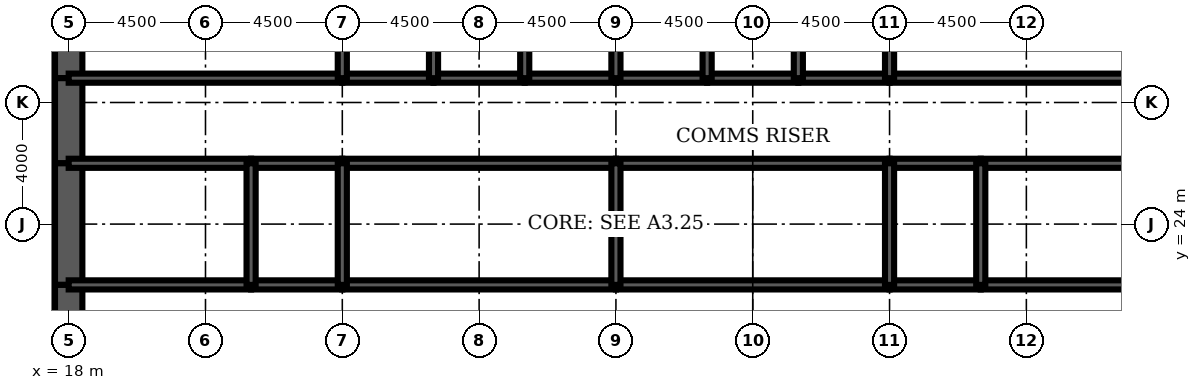
"""IFC4 building model, lengths in metres.
Left out: names, types, materials, properties, quantities, classifications, styles, units other than length and angle.
Written with IfcOpenShell. Run it as: python <this file> out.ifc"""

import sys

from ifc_helpers import new_model, si_unit, direction, frame, frame_2d, origin, place, context, subcontext, project, spatial, rectangle, extrude, element, fill, save


model = new_model("IFC4")
c1 = context("Model", 3, precision=1e-05, world=origin(), true_north=direction((0.0, 1.0)))
c2 = subcontext(c1, "Body", "Model", "MODEL_VIEW")
j1 = project(units=[si_unit("LENGTHUNIT", "METRE"), si_unit("PLANEANGLEUNIT", "RADIAN")], contexts=[c1])
p1 = place(None, origin())
s1 = spatial("IfcSite", under=j1, at=p1, CompositionType="ELEMENT")
p2 = place(p1, origin())
s2 = spatial("IfcBuilding", under=s1, at=p2, CompositionType="ELEMENT")
p3 = place(p2, frame((0.0, 0.0, 108.9)))
s3 = spatial("IfcBuildingStorey", under=s2, at=p3, CompositionType="ELEMENT", Elevation=108.9)
p4 = place(p3, frame((18.0, 32.0, 0.0), z_axis=(0.0, 0.0, 1.0), x_axis=(0.0, -1.0, 0.0)))
e1 = element("IfcWall", 1, at=p4, inside=s3, PredefinedType="SHEAR", context=c2, shape_type="SweptSolid", body=[
    extrude(rectangle(XDim=3.2, YDim=0.9, at=frame_2d((1.6, 0.0))), origin(), (0.0, 0.0, 1.0), 4.2),
])
p5 = place(p3, frame((18.0, 28.8, 0.0), z_axis=(0.0, 0.0, 1.0), x_axis=(0.0, -1.0, 0.0)))
e2 = element("IfcWall", 2, at=p5, inside=s3, PredefinedType="SHEAR", context=c2, shape_type="SweptSolid", body=[
    extrude(rectangle(XDim=2.8, YDim=0.9, at=frame_2d((1.4, 0.0))), origin(), (0.0, 0.0, 1.0), 4.2),
])
p6 = place(p5, frame((0.4, 0.0, 0.0)))
e3 = element("IfcOpeningElement", 3, at=p6, cuts=e2, PredefinedType="OPENING", context=c2, shape_type="SweptSolid", body=[
    extrude(rectangle(XDim=1.8, YDim=2.1, at=frame_2d((0.9, 1.05))), frame((0.0, 0.46, 0.0), z_axis=(0.0, -1.0, 0.0), x_axis=(1.0, 0.0, 0.0)), (0.0, 0.0, 1.0), 0.92),
])
p7 = place(p3, frame((18.0, 26.0, 0.0), z_axis=(0.0, 0.0, 1.0), x_axis=(0.0, -1.0, 0.0)))
e4 = element("IfcWall", 4, at=p7, inside=s3, PredefinedType="SHEAR", context=c2, shape_type="SweptSolid", body=[
    extrude(rectangle(XDim=4.0, YDim=0.9, at=frame_2d((2.0, 0.0))), origin(), (0.0, 0.0, 1.0), 4.2),
])
p8 = place(p3, frame((18.0, 22.0, 0.0), z_axis=(0.0, 0.0, 1.0), x_axis=(0.0, -1.0, 0.0)))
e5 = element("IfcWall", 5, at=p8, inside=s3, PredefinedType="SHEAR", context=c2, shape_type="SweptSolid", body=[
    extrude(rectangle(XDim=2.8, YDim=0.9, at=frame_2d((1.4, 0.0))), origin(), (0.0, 0.0, 1.0), 4.2),
])
p9 = place(p8, frame((0.6, 0.0, 0.0)))
e6 = element("IfcOpeningElement", 6, at=p9, cuts=e5, PredefinedType="OPENING", context=c2, shape_type="SweptSolid", body=[
    extrude(rectangle(XDim=1.8, YDim=2.1, at=frame_2d((0.9, 1.05))), frame((0.0, 0.46, 0.0), z_axis=(0.0, -1.0, 0.0), x_axis=(1.0, 0.0, 0.0)), (0.0, 0.0, 1.0), 0.92),
])
p10 = place(p3, frame((18.0, 28.8, 0.0), z_axis=(0.0, 0.0, 1.0), x_axis=(1.0, 0.0, 0.0)))
e7 = element("IfcWall", 7, at=p10, inside=s3, PredefinedType="SOLIDWALL", context=c2, shape_type="SweptSolid", body=[
    extrude(rectangle(XDim=9.0, YDim=0.3, at=frame_2d((4.5, 0.0))), origin(), (0.0, 0.0, 1.0), 4.2),
])
p11 = place(p10, frame((0.65, 0.0, 0.0)))
e8 = element("IfcOpeningElement", 8, at=p11, cuts=e7, PredefinedType="OPENING", context=c2, shape_type="SweptSolid", body=[
    extrude(rectangle(XDim=1.0, YDim=2.1, at=frame_2d((0.5, 1.05))), frame((0.0, 0.16, 0.0), z_axis=(0.0, -1.0, 0.0), x_axis=(1.0, 0.0, 0.0)), (0.0, 0.0, 1.0), 0.32),
])
p12 = place(p3, frame((27.0, 28.8, 0.0), z_axis=(0.0, 0.0, 1.0), x_axis=(1.0, 0.0, 0.0)))
e9 = element("IfcWall", 9, at=p12, inside=s3, PredefinedType="SOLIDWALL", context=c2, shape_type="SweptSolid", body=[
    extrude(rectangle(XDim=3.0, YDim=0.3, at=frame_2d((1.5, 0.0))), origin(), (0.0, 0.0, 1.0), 4.2),
])
p13 = place(p12, frame((0.95, 0.0, 0.0)))
e10 = element("IfcOpeningElement", 10, at=p13, cuts=e9, PredefinedType="OPENING", context=c2, shape_type="SweptSolid", body=[
    extrude(rectangle(XDim=1.1, YDim=2.2, at=frame_2d((0.55, 1.1))), frame((0.0, 0.16, 0.0), z_axis=(0.0, -1.0, 0.0), x_axis=(1.0, 0.0, 0.0)), (0.0, 0.0, 1.0), 0.32),
])
p14 = place(p3, frame((30.0, 28.8, 0.0), z_axis=(0.0, 0.0, 1.0), x_axis=(1.0, 0.0, 0.0)))
e11 = element("IfcWall", 11, at=p14, inside=s3, PredefinedType="SOLIDWALL", context=c2, shape_type="SweptSolid", body=[
    extrude(rectangle(XDim=3.0, YDim=0.3, at=frame_2d((1.5, 0.0))), origin(), (0.0, 0.0, 1.0), 4.2),
])
p15 = place(p14, frame((0.95, 0.0, 0.0)))
e12 = element("IfcOpeningElement", 12, at=p15, cuts=e11, PredefinedType="OPENING", context=c2, shape_type="SweptSolid", body=[
    extrude(rectangle(XDim=1.1, YDim=2.2, at=frame_2d((0.55, 1.1))), frame((0.0, 0.16, 0.0), z_axis=(0.0, -1.0, 0.0), x_axis=(1.0, 0.0, 0.0)), (0.0, 0.0, 1.0), 0.32),
])
p16 = place(p3, frame((33.0, 28.8, 0.0), z_axis=(0.0, 0.0, 1.0), x_axis=(1.0, 0.0, 0.0)))
e13 = element("IfcWall", 13, at=p16, inside=s3, PredefinedType="SOLIDWALL", context=c2, shape_type="SweptSolid", body=[
    extrude(rectangle(XDim=3.0, YDim=0.3, at=frame_2d((1.5, 0.0))), origin(), (0.0, 0.0, 1.0), 4.2),
])
p17 = place(p16, frame((0.95, 0.0, 0.0)))
e14 = element("IfcOpeningElement", 14, at=p17, cuts=e13, PredefinedType="OPENING", context=c2, shape_type="SweptSolid", body=[
    extrude(rectangle(XDim=1.1, YDim=2.2, at=frame_2d((0.55, 1.1))), frame((0.0, 0.16, 0.0), z_axis=(0.0, -1.0, 0.0), x_axis=(1.0, 0.0, 0.0)), (0.0, 0.0, 1.0), 0.32),
])
for number, where, z_axis, x_axis in (
    (15, (36.0, 28.8, 0.0), (0.0, 0.0, 1.0), (1.0, 0.0, 0.0)),
    (16, (39.0, 28.8, 0.0), (0.0, 0.0, 1.0), (1.0, 0.0, 0.0)),
):
    element("IfcWall", number, at=place(p3, frame(where, z_axis=z_axis, x_axis=x_axis)), inside=s3, PredefinedType="SOLIDWALL", context=c2, shape_type="SweptSolid", body=[
        extrude(rectangle(XDim=3.0, YDim=0.3, at=frame_2d((1.5, 0.0))), origin(), (0.0, 0.0, 1.0), 4.2),
    ])
p18 = place(p3, frame((42.0, 28.8, 0.0), z_axis=(0.0, 0.0, 1.0), x_axis=(1.0, 0.0, 0.0)))
e17 = element("IfcWall", 17, at=p18, inside=s3, PredefinedType="SOLIDWALL", context=c2, shape_type="SweptSolid", body=[
    extrude(rectangle(XDim=3.0, YDim=0.3, at=frame_2d((1.5, 0.0))), origin(), (0.0, 0.0, 1.0), 4.2),
])
p19 = place(p18, frame((0.95, 0.0, 0.0)))
e18 = element("IfcOpeningElement", 18, at=p19, cuts=e17, PredefinedType="OPENING", context=c2, shape_type="SweptSolid", body=[
    extrude(rectangle(XDim=1.1, YDim=2.2, at=frame_2d((0.55, 1.1))), frame((0.0, 0.16, 0.0), z_axis=(0.0, -1.0, 0.0), x_axis=(1.0, 0.0, 0.0)), (0.0, 0.0, 1.0), 0.32),
])
p20 = place(p3, frame((45.0, 28.8, 0.0), z_axis=(0.0, 0.0, 1.0), x_axis=(1.0, 0.0, 0.0)))
e19 = element("IfcWall", 19, at=p20, inside=s3, PredefinedType="SOLIDWALL", context=c2, shape_type="SweptSolid", body=[
    extrude(rectangle(XDim=9.0, YDim=0.3, at=frame_2d((4.5, 0.0))), origin(), (0.0, 0.0, 1.0), 4.2),
])
p21 = place(p20, frame((7.35, 0.0, 0.0)))
e20 = element("IfcOpeningElement", 20, at=p21, cuts=e19, PredefinedType="OPENING", context=c2, shape_type="SweptSolid", body=[
    extrude(rectangle(XDim=1.0, YDim=2.1, at=frame_2d((0.5, 1.05))), frame((0.0, 0.16, 0.0), z_axis=(0.0, -1.0, 0.0), x_axis=(1.0, 0.0, 0.0)), (0.0, 0.0, 1.0), 0.32),
])
p22 = place(p3, frame((18.0, 22.0, 0.0), z_axis=(0.0, 0.0, 1.0), x_axis=(1.0, 0.0, 0.0)))
e21 = element("IfcWall", 21, at=p22, inside=s3, PredefinedType="SOLIDWALL", context=c2, shape_type="SweptSolid", body=[
    extrude(rectangle(XDim=6.0, YDim=0.3, at=frame_2d((3.0, 0.0))), origin(), (0.0, 0.0, 1.0), 4.2),
])
p23 = place(p22, frame((4.4, 0.0, 0.0)))
e22 = element("IfcOpeningElement", 22, at=p23, cuts=e21, PredefinedType="OPENING", context=c2, shape_type="SweptSolid", body=[
    extrude(rectangle(XDim=1.0, YDim=2.1, at=frame_2d((0.5, 1.05))), frame((0.0, 0.16, 0.0), z_axis=(0.0, -1.0, 0.0), x_axis=(1.0, 0.0, 0.0)), (0.0, 0.0, 1.0), 0.32),
])
p24 = place(p22, frame((0.85, 0.0, 0.0)))
e23 = element("IfcOpeningElement", 23, at=p24, cuts=e21, PredefinedType="OPENING", context=c2, shape_type="SweptSolid", body=[
    extrude(rectangle(XDim=1.0, YDim=2.1, at=frame_2d((0.5, 1.05))), frame((0.0, 0.16, 0.0), z_axis=(0.0, -1.0, 0.0), x_axis=(1.0, 0.0, 0.0)), (0.0, 0.0, 1.0), 0.32),
])
p25 = place(p3, frame((24.0, 22.0, 0.0), z_axis=(0.0, 0.0, 1.0), x_axis=(1.0, 0.0, 0.0)))
e24 = element("IfcWall", 24, at=p25, inside=s3, PredefinedType="SOLIDWALL", context=c2, shape_type="SweptSolid", body=[
    extrude(rectangle(XDim=3.0, YDim=0.3, at=frame_2d((1.5, 0.0))), origin(), (0.0, 0.0, 1.0), 4.2),
])
p26 = place(p25, frame((1.0, 0.0, 0.0)))
e25 = element("IfcOpeningElement", 25, at=p26, cuts=e24, PredefinedType="OPENING", context=c2, shape_type="SweptSolid", body=[
    extrude(rectangle(XDim=1.0, YDim=2.1, at=frame_2d((0.5, 1.05))), frame((0.0, 0.16, 0.0), z_axis=(0.0, -1.0, 0.0), x_axis=(1.0, 0.0, 0.0)), (0.0, 0.0, 1.0), 0.32),
])
p27 = place(p3, frame((27.0, 22.0, 0.0), z_axis=(0.0, 0.0, 1.0), x_axis=(1.0, 0.0, 0.0)))
e26 = element("IfcWall", 26, at=p27, inside=s3, PredefinedType="SOLIDWALL", context=c2, shape_type="SweptSolid", body=[
    extrude(rectangle(XDim=9.0, YDim=0.3, at=frame_2d((4.5, 0.0))), origin(), (0.0, 0.0, 1.0), 4.2),
])
p28 = place(p27, frame((4.0, 0.0, 0.0)))
e27 = element("IfcOpeningElement", 27, at=p28, cuts=e26, PredefinedType="OPENING", context=c2, shape_type="SweptSolid", body=[
    extrude(rectangle(XDim=1.0, YDim=2.1, at=frame_2d((0.5, 1.05))), frame((0.0, 0.16, 0.0), z_axis=(0.0, -1.0, 0.0), x_axis=(1.0, 0.0, 0.0)), (0.0, 0.0, 1.0), 0.32),
])
p29 = place(p3, frame((36.0, 22.0, 0.0), z_axis=(0.0, 0.0, 1.0), x_axis=(1.0, 0.0, 0.0)))
e28 = element("IfcWall", 28, at=p29, inside=s3, PredefinedType="SOLIDWALL", context=c2, shape_type="SweptSolid", body=[
    extrude(rectangle(XDim=9.0, YDim=0.3, at=frame_2d((4.5, 0.0))), origin(), (0.0, 0.0, 1.0), 4.2),
])
p30 = place(p29, frame((4.0, 0.0, 0.0)))
e29 = element("IfcOpeningElement", 29, at=p30, cuts=e28, PredefinedType="OPENING", context=c2, shape_type="SweptSolid", body=[
    extrude(rectangle(XDim=1.0, YDim=2.1, at=frame_2d((0.5, 1.05))), frame((0.0, 0.16, 0.0), z_axis=(0.0, -1.0, 0.0), x_axis=(1.0, 0.0, 0.0)), (0.0, 0.0, 1.0), 0.32),
])
p31 = place(p3, frame((45.0, 22.0, 0.0), z_axis=(0.0, 0.0, 1.0), x_axis=(1.0, 0.0, 0.0)))
e30 = element("IfcWall", 30, at=p31, inside=s3, PredefinedType="SOLIDWALL", context=c2, shape_type="SweptSolid", body=[
    extrude(rectangle(XDim=3.0, YDim=0.3, at=frame_2d((1.5, 0.0))), origin(), (0.0, 0.0, 1.0), 4.2),
])
p32 = place(p31, frame((1.0, 0.0, 0.0)))
e31 = element("IfcOpeningElement", 31, at=p32, cuts=e30, PredefinedType="OPENING", context=c2, shape_type="SweptSolid", body=[
    extrude(rectangle(XDim=1.0, YDim=2.1, at=frame_2d((0.5, 1.05))), frame((0.0, 0.16, 0.0), z_axis=(0.0, -1.0, 0.0), x_axis=(1.0, 0.0, 0.0)), (0.0, 0.0, 1.0), 0.32),
])
p33 = place(p3, frame((48.0, 22.0, 0.0), z_axis=(0.0, 0.0, 1.0), x_axis=(1.0, 0.0, 0.0)))
e32 = element("IfcWall", 32, at=p33, inside=s3, PredefinedType="SOLIDWALL", context=c2, shape_type="SweptSolid", body=[
    extrude(rectangle(XDim=6.0, YDim=0.3, at=frame_2d((3.0, 0.0))), origin(), (0.0, 0.0, 1.0), 4.2),
])
p34 = place(p33, frame((2.0, 0.0, 0.0)))
e33 = element("IfcOpeningElement", 33, at=p34, cuts=e32, PredefinedType="OPENING", context=c2, shape_type="SweptSolid", body=[
    extrude(rectangle(XDim=1.0, YDim=2.1, at=frame_2d((0.5, 1.05))), frame((0.0, 0.16, 0.0), z_axis=(0.0, -1.0, 0.0), x_axis=(1.0, 0.0, 0.0)), (0.0, 0.0, 1.0), 0.32),
])
p35 = place(p33, frame((4.15, 0.0, 0.0)))
e34 = element("IfcOpeningElement", 34, at=p35, cuts=e32, PredefinedType="OPENING", context=c2, shape_type="SweptSolid", body=[
    extrude(rectangle(XDim=1.0, YDim=2.1, at=frame_2d((0.5, 1.05))), frame((0.0, 0.16, 0.0), z_axis=(0.0, -1.0, 0.0), x_axis=(1.0, 0.0, 0.0)), (0.0, 0.0, 1.0), 0.32),
])
p36 = place(p3, frame((18.0, 26.0, 0.0), z_axis=(0.0, 0.0, 1.0), x_axis=(1.0, 0.0, 0.0)))
e35 = element("IfcWall", 35, at=p36, inside=s3, PredefinedType="SOLIDWALL", context=c2, shape_type="SweptSolid", body=[
    extrude(rectangle(XDim=6.0, YDim=0.3, at=frame_2d((3.0, 0.0))), origin(), (0.0, 0.0, 1.0), 4.2),
])
p37 = place(p3, frame((24.0, 26.0, 0.0), z_axis=(0.0, 0.0, 1.0), x_axis=(1.0, 0.0, 0.0)))
e36 = element("IfcWall", 36, at=p37, inside=s3, PredefinedType="SOLIDWALL", context=c2, shape_type="SweptSolid", body=[
    extrude(rectangle(XDim=3.0, YDim=0.3, at=frame_2d((1.5, 0.0))), origin(), (0.0, 0.0, 1.0), 4.2),
])
for number, where, z_axis, x_axis in (
    (37, (27.0, 26.0, 0.0), (0.0, 0.0, 1.0), (1.0, 0.0, 0.0)),
    (38, (36.0, 26.0, 0.0), (0.0, 0.0, 1.0), (1.0, 0.0, 0.0)),
):
    element("IfcWall", number, at=place(p3, frame(where, z_axis=z_axis, x_axis=x_axis)), inside=s3, PredefinedType="SOLIDWALL", context=c2, shape_type="SweptSolid", body=[
        extrude(rectangle(XDim=9.0, YDim=0.3, at=frame_2d((4.5, 0.0))), origin(), (0.0, 0.0, 1.0), 4.2),
    ])
p38 = place(p3, frame((45.0, 26.0, 0.0), z_axis=(0.0, 0.0, 1.0), x_axis=(1.0, 0.0, 0.0)))
e39 = element("IfcWall", 39, at=p38, inside=s3, PredefinedType="SOLIDWALL", context=c2, shape_type="SweptSolid", body=[
    extrude(rectangle(XDim=3.0, YDim=0.3, at=frame_2d((1.5, 0.0))), origin(), (0.0, 0.0, 1.0), 4.2),
])
p39 = place(p3, frame((48.0, 26.0, 0.0), z_axis=(0.0, 0.0, 1.0), x_axis=(1.0, 0.0, 0.0)))
e40 = element("IfcWall", 40, at=p39, inside=s3, PredefinedType="SOLIDWALL", context=c2, shape_type="SweptSolid", body=[
    extrude(rectangle(XDim=6.0, YDim=0.3, at=frame_2d((3.0, 0.0))), origin(), (0.0, 0.0, 1.0), 4.2),
])
for number, where, z_axis, x_axis in (
    (41, (27.0, 28.8, 0.0), (0.0, 0.0, 1.0), (0.0, 1.0, 0.0)),
    (42, (30.0, 28.8, 0.0), (0.0, 0.0, 1.0), (0.0, 1.0, 0.0)),
    (43, (33.0, 28.8, 0.0), (0.0, 0.0, 1.0), (0.0, 1.0, 0.0)),
    (44, (36.0, 28.8, 0.0), (0.0, 0.0, 1.0), (0.0, 1.0, 0.0)),
    (45, (39.0, 28.8, 0.0), (0.0, 0.0, 1.0), (0.0, 1.0, 0.0)),
    (46, (42.0, 28.8, 0.0), (0.0, 0.0, 1.0), (0.0, 1.0, 0.0)),
    (47, (45.0, 28.8, 0.0), (0.0, 0.0, 1.0), (0.0, 1.0, 0.0)),
):
    element("IfcWall", number, at=place(p3, frame(where, z_axis=z_axis, x_axis=x_axis)), inside=s3, PredefinedType="SOLIDWALL", context=c2, shape_type="SweptSolid", body=[
        extrude(rectangle(XDim=3.2, YDim=0.3, at=frame_2d((1.6, 0.0))), origin(), (0.0, 0.0, 1.0), 4.2),
    ])
for number, where, z_axis, x_axis in (
    (48, (24.0, 22.0, 0.0), (0.0, 0.0, 1.0), (0.0, 1.0, 0.0)),
    (49, (27.0, 22.0, 0.0), (0.0, 0.0, 1.0), (0.0, 1.0, 0.0)),
    (50, (36.0, 22.0, 0.0), (0.0, 0.0, 1.0), (0.0, 1.0, 0.0)),
    (51, (45.0, 22.0, 0.0), (0.0, 0.0, 1.0), (0.0, 1.0, 0.0)),
    (52, (48.0, 22.0, 0.0), (0.0, 0.0, 1.0), (0.0, 1.0, 0.0)),
):
    element("IfcWall", number, at=place(p3, frame(where, z_axis=z_axis, x_axis=x_axis)), inside=s3, PredefinedType="SOLIDWALL", context=c2, shape_type="SweptSolid", body=[
        extrude(rectangle(XDim=4.0, YDim=0.3, at=frame_2d((2.0, 0.0))), origin(), (0.0, 0.0, 1.0), 4.2),
    ])
for number, where, z_axis, x_axis in (
    (53, (20.325, 22.15, 0.0), (0.0, 0.0, 1.0), (0.0, 1.0, 0.0)),
    (54, (51.675, 22.15, 0.0), (0.0, 0.0, 1.0), (0.0, 1.0, 0.0)),
):
    element("IfcWall", number, at=place(p3, frame(where, z_axis=z_axis, x_axis=x_axis)), inside=s3, PredefinedType="PARTITIONING", context=c2, shape_type="SweptSolid", body=[
        extrude(rectangle(XDim=3.7, YDim=0.15, at=frame_2d((1.85, 0.0))), origin(), (0.0, 0.0, 1.0), 3.0),
    ])
p40 = place(p3, frame((23.7, 26.15, 0.0), z_axis=(0.0, 0.0, 1.0), x_axis=(0.0, 1.0, 0.0)))
e55 = element("IfcWall", 55, at=p40, inside=s3, PredefinedType="PARTITIONING", context=c2, shape_type="SweptSolid", body=[
    extrude(rectangle(XDim=2.5, YDim=0.15, at=frame_2d((1.25, 0.0))), origin(), (0.0, 0.0, 1.0), 3.0),
])
p41 = place(p40, frame((0.35, 0.0, 0.0)))
e56 = element("IfcOpeningElement", 56, at=p41, cuts=e55, PredefinedType="OPENING", context=c2, shape_type="SweptSolid", body=[
    extrude(rectangle(XDim=1.0, YDim=2.1, at=frame_2d((0.5, 1.05))), frame((0.0, 0.085, 0.0), z_axis=(0.0, -1.0, 0.0), x_axis=(1.0, 0.0, 0.0)), (0.0, 0.0, 1.0), 0.17),
])
p42 = place(p41, origin())
e57 = element("IfcDoor", 57, at=p42, inside=s3, OperationType="SINGLE_SWING_LEFT", PredefinedType="DOOR", context=c2, shape_type="SweptSolid", body=[
    extrude(rectangle(XDim=1.0, YDim=2.1, at=frame_2d((0.5, 1.05))), frame((0.0, 0.025, 0.0), z_axis=(0.0, -1.0, 0.0), x_axis=(1.0, 0.0, 0.0)), (0.0, 0.0, 1.0), 0.05),
])
fill(e56, e57)
p43 = place(p19, origin())
e58 = element("IfcDoor", 58, at=p43, inside=s3, OperationType="DOUBLE_DOOR_SLIDING", PredefinedType="USERDEFINED", context=c2, shape_type="SweptSolid", body=[
    extrude(rectangle(XDim=1.1, YDim=2.2, at=frame_2d((0.55, 1.1))), frame((0.0, 0.025, 0.0), z_axis=(0.0, -1.0, 0.0), x_axis=(1.0, 0.0, 0.0)), (0.0, 0.0, 1.0), 0.05),
])
fill(e18, e58)
p44 = place(p13, origin())
e59 = element("IfcDoor", 59, at=p44, inside=s3, OperationType="DOUBLE_DOOR_SLIDING", PredefinedType="USERDEFINED", context=c2, shape_type="SweptSolid", body=[
    extrude(rectangle(XDim=1.1, YDim=2.2, at=frame_2d((0.55, 1.1))), frame((0.0, 0.025, 0.0), z_axis=(0.0, -1.0, 0.0), x_axis=(1.0, 0.0, 0.0)), (0.0, 0.0, 1.0), 0.05),
])
fill(e10, e59)
p45 = place(p15, origin())
e60 = element("IfcDoor", 60, at=p45, inside=s3, OperationType="DOUBLE_DOOR_SLIDING", PredefinedType="USERDEFINED", context=c2, shape_type="SweptSolid", body=[
    extrude(rectangle(XDim=1.1, YDim=2.2, at=frame_2d((0.55, 1.1))), frame((0.0, 0.025, 0.0), z_axis=(0.0, -1.0, 0.0), x_axis=(1.0, 0.0, 0.0)), (0.0, 0.0, 1.0), 0.05),
])
fill(e12, e60)
p46 = place(p17, origin())
e61 = element("IfcDoor", 61, at=p46, inside=s3, OperationType="DOUBLE_DOOR_SLIDING", PredefinedType="USERDEFINED", context=c2, shape_type="SweptSolid", body=[
    extrude(rectangle(XDim=1.1, YDim=2.2, at=frame_2d((0.55, 1.1))), frame((0.0, 0.025, 0.0), z_axis=(0.0, -1.0, 0.0), x_axis=(1.0, 0.0, 0.0)), (0.0, 0.0, 1.0), 0.05),
])
fill(e14, e61)
p47 = place(p11, origin())
e62 = element("IfcDoor", 62, at=p47, inside=s3, OperationType="SINGLE_SWING_LEFT", PredefinedType="DOOR", context=c2, shape_type="SweptSolid", body=[
    extrude(rectangle(XDim=1.0, YDim=2.1, at=frame_2d((0.5, 1.05))), frame((0.0, 0.025, 0.0), z_axis=(0.0, -1.0, 0.0), x_axis=(1.0, 0.0, 0.0)), (0.0, 0.0, 1.0), 0.05),
])
fill(e8, e62)
p48 = place(p21, origin())
e63 = element("IfcDoor", 63, at=p48, inside=s3, OperationType="SINGLE_SWING_RIGHT", PredefinedType="DOOR", context=c2, shape_type="SweptSolid", body=[
    extrude(rectangle(XDim=1.0, YDim=2.1, at=frame_2d((0.5, 1.05))), frame((0.0, 0.025, 0.0), z_axis=(0.0, -1.0, 0.0), x_axis=(1.0, 0.0, 0.0)), (0.0, 0.0, 1.0), 0.05),
])
fill(e20, e63)
p49 = place(p9, origin())
e64 = element("IfcDoor", 64, at=p49, inside=s3, OperationType="SINGLE_SWING_LEFT", PredefinedType="DOOR", context=c2, shape_type="SweptSolid", body=[
    extrude(rectangle(XDim=1.8, YDim=2.1, at=frame_2d((0.9, 1.05))), frame((0.0, 0.45, 0.0), z_axis=(0.0, -1.0, 0.0), x_axis=(1.0, 0.0, 0.0)), (0.0, 0.0, 1.0), 0.899),
])
fill(e6, e64)
p50 = place(p6, origin())
e65 = element("IfcDoor", 65, at=p50, inside=s3, OperationType="SINGLE_SWING_LEFT", PredefinedType="DOOR", context=c2, shape_type="SweptSolid", body=[
    extrude(rectangle(XDim=1.8, YDim=2.1, at=frame_2d((0.9, 1.05))), frame((0.0, 0.45, 0.0), z_axis=(0.0, -1.0, 0.0), x_axis=(1.0, 0.0, 0.0)), (0.0, 0.0, 1.0), 0.899),
])
fill(e3, e65)
p51 = place(p23, origin())
e66 = element("IfcDoor", 66, at=p51, inside=s3, OperationType="SINGLE_SWING_RIGHT", PredefinedType="DOOR", context=c2, shape_type="SweptSolid", body=[
    extrude(rectangle(XDim=1.0, YDim=2.1, at=frame_2d((0.5, 1.05))), frame((0.0, 0.025, 0.0), z_axis=(0.0, -1.0, 0.0), x_axis=(1.0, 0.0, 0.0)), (0.0, 0.0, 1.0), 0.05),
])
fill(e22, e66)
p52 = place(p26, origin())
e67 = element("IfcDoor", 67, at=p52, inside=s3, OperationType="SINGLE_SWING_LEFT", PredefinedType="DOOR", context=c2, shape_type="SweptSolid", body=[
    extrude(rectangle(XDim=1.0, YDim=2.1, at=frame_2d((0.5, 1.05))), frame((0.0, 0.025, 0.0), z_axis=(0.0, -1.0, 0.0), x_axis=(1.0, 0.0, 0.0)), (0.0, 0.0, 1.0), 0.05),
])
fill(e25, e67)
p53 = place(p28, origin())
e68 = element("IfcDoor", 68, at=p53, inside=s3, OperationType="SINGLE_SWING_LEFT", PredefinedType="DOOR", context=c2, shape_type="SweptSolid", body=[
    extrude(rectangle(XDim=1.0, YDim=2.1, at=frame_2d((0.5, 1.05))), frame((0.0, 0.025, 0.0), z_axis=(0.0, -1.0, 0.0), x_axis=(1.0, 0.0, 0.0)), (0.0, 0.0, 1.0), 0.05),
])
fill(e27, e68)
p54 = place(p30, origin())
e69 = element("IfcDoor", 69, at=p54, inside=s3, OperationType="SINGLE_SWING_LEFT", PredefinedType="DOOR", context=c2, shape_type="SweptSolid", body=[
    extrude(rectangle(XDim=1.0, YDim=2.1, at=frame_2d((0.5, 1.05))), frame((0.0, 0.025, 0.0), z_axis=(0.0, -1.0, 0.0), x_axis=(1.0, 0.0, 0.0)), (0.0, 0.0, 1.0), 0.05),
])
fill(e29, e69)
p55 = place(p32, origin())
e70 = element("IfcDoor", 70, at=p55, inside=s3, OperationType="SINGLE_SWING_LEFT", PredefinedType="DOOR", context=c2, shape_type="SweptSolid", body=[
    extrude(rectangle(XDim=1.0, YDim=2.1, at=frame_2d((0.5, 1.05))), frame((0.0, 0.025, 0.0), z_axis=(0.0, -1.0, 0.0), x_axis=(1.0, 0.0, 0.0)), (0.0, 0.0, 1.0), 0.05),
])
fill(e31, e70)
p56 = place(p34, origin())
e71 = element("IfcDoor", 71, at=p56, inside=s3, OperationType="SINGLE_SWING_LEFT", PredefinedType="DOOR", context=c2, shape_type="SweptSolid", body=[
    extrude(rectangle(XDim=1.0, YDim=2.1, at=frame_2d((0.5, 1.05))), frame((0.0, 0.025, 0.0), z_axis=(0.0, -1.0, 0.0), x_axis=(1.0, 0.0, 0.0)), (0.0, 0.0, 1.0), 0.05),
])
fill(e33, e71)
p57 = place(p24, origin())
e72 = element("IfcDoor", 72, at=p57, inside=s3, OperationType="SINGLE_SWING_LEFT", PredefinedType="DOOR", context=c2, shape_type="SweptSolid", body=[
    extrude(rectangle(XDim=1.0, YDim=2.1, at=frame_2d((0.5, 1.05))), frame((0.0, 0.025, 0.0), z_axis=(0.0, -1.0, 0.0), x_axis=(1.0, 0.0, 0.0)), (0.0, 0.0, 1.0), 0.05),
])
fill(e23, e72)
p58 = place(p35, origin())
e73 = element("IfcDoor", 73, at=p58, inside=s3, OperationType="SINGLE_SWING_RIGHT", PredefinedType="DOOR", context=c2, shape_type="SweptSolid", body=[
    extrude(rectangle(XDim=1.0, YDim=2.1, at=frame_2d((0.5, 1.05))), frame((0.0, 0.025, 0.0), z_axis=(0.0, -1.0, 0.0), x_axis=(1.0, 0.0, 0.0)), (0.0, 0.0, 1.0), 0.05),
])
fill(e34, e73)
save(model, sys.argv[1])
